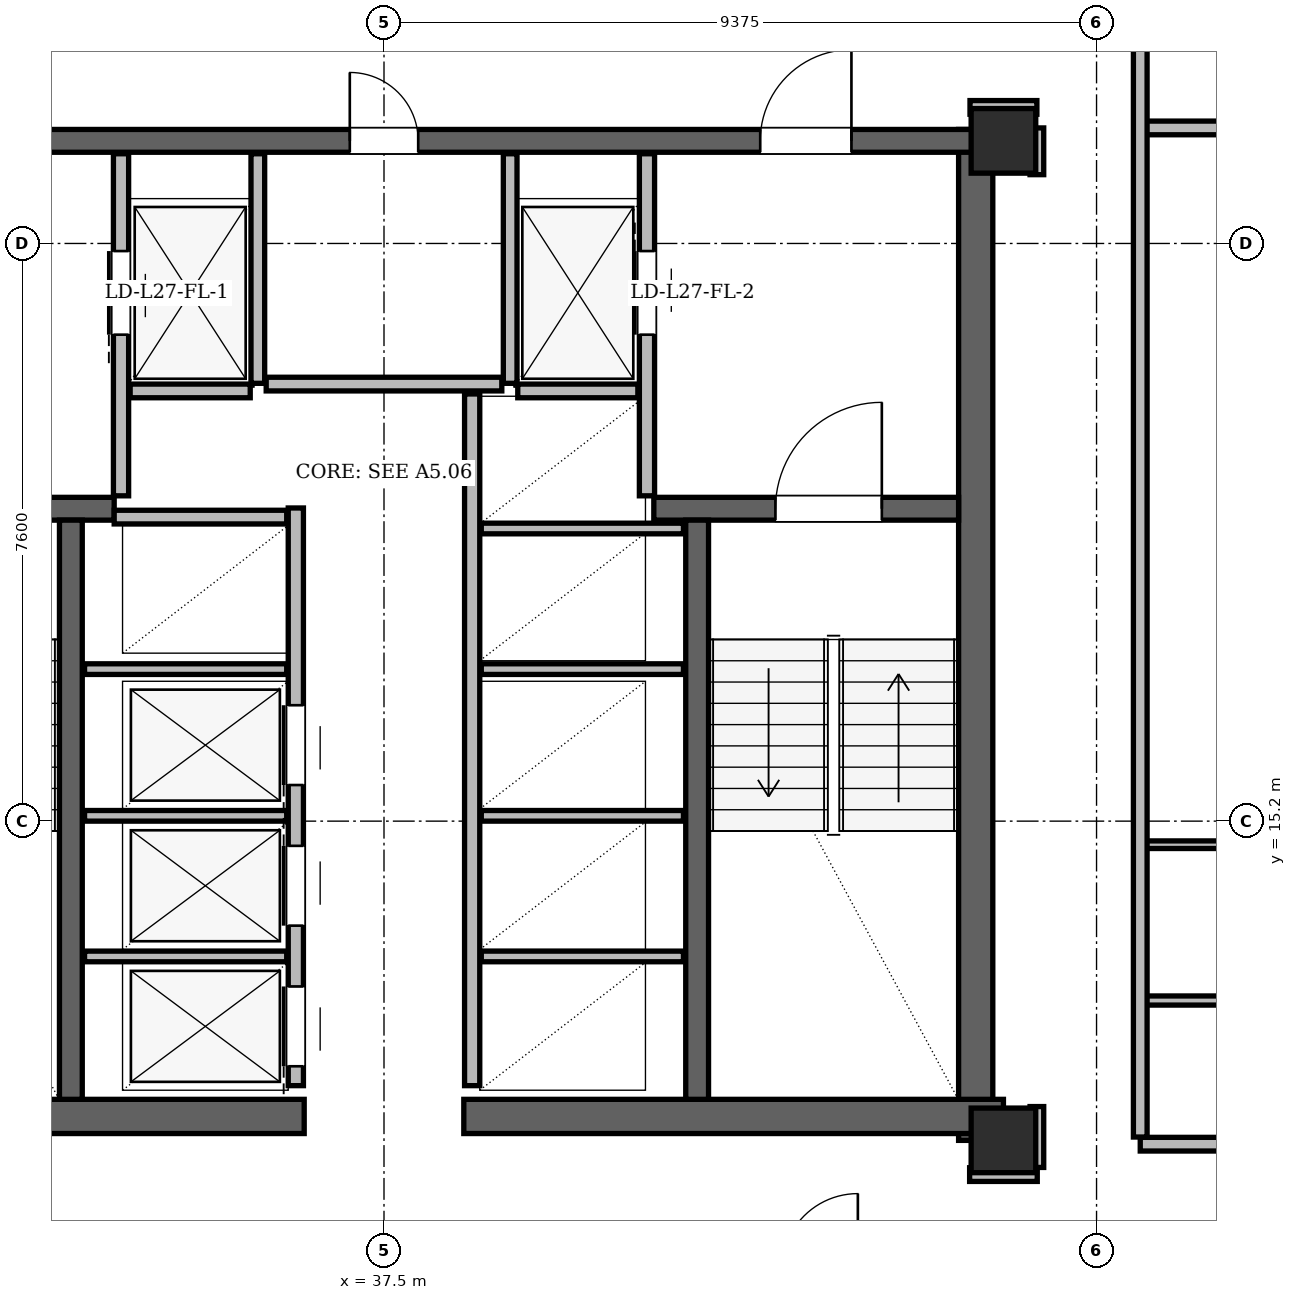
"""IFC4 building model, lengths in metres.
Left out: names, types, materials, properties, quantities, classifications, styles, units other than length and angle.
Written with IfcOpenShell. Run it as: python <this file> out.ifc"""

import sys

from ifc_helpers import new_model, si_unit, direction, frame, frame_2d, origin, origin_2d, place, context, subcontext, project, spatial, rectangle, hollow_rectangle, extrude, element, fill, save


model = new_model("IFC4")
c1 = context("Model", 3, precision=1e-05, world=origin(), true_north=direction((0.0, 1.0)))
c2 = subcontext(c1, "Body", "Model", "MODEL_VIEW")
j1 = project(units=[si_unit("LENGTHUNIT", "METRE"), si_unit("PLANEANGLEUNIT", "RADIAN")], contexts=[c1])
p1 = place(None, origin())
s1 = spatial("IfcSite", under=j1, at=p1, CompositionType="ELEMENT")
p2 = place(p1, origin())
s2 = spatial("IfcBuilding", under=s1, at=p2, CompositionType="ELEMENT")
p3 = place(p2, frame((0.0, 0.0, 104.1)))
s3 = spatial("IfcBuildingStorey", under=s2, at=p3, CompositionType="ELEMENT", Elevation=104.1)
for number, where, z_axis, x_axis in (
    (1, (45.65, 11.0, 0.0), (0.0, 0.0, 1.0), (1.0, 0.0, 0.0)),
    (2, (45.65, 24.15, 0.0), (0.0, 0.0, 1.0), (1.0, 0.0, 0.0)),
):
    element("IfcColumn", number, at=place(p3, frame(where, z_axis=z_axis, x_axis=x_axis)), inside=s3, PredefinedType="COLUMN", context=c2, shape_type="SweptSolid", body=[
        extrude(hollow_rectangle(XDim=0.85, YDim=0.85, WallThickness=0.07, at=origin_2d()), origin(), (0.0, 0.0, 1.0), 3.6),
    ])
p4 = place(p3, frame((45.285, 11.0, 0.0), z_axis=(0.0, 0.0, 1.0), x_axis=(0.0, 1.0, 0.0)))
e3 = element("IfcWall", 3, at=p4, inside=s3, PredefinedType="SHEAR", context=c2, shape_type="SweptSolid", body=[
    extrude(rectangle(XDim=13.3, YDim=0.45, at=frame_2d((6.65, 0.0))), origin(), (0.0, 0.0, 1.0), 3.36),
])
for number, where, z_axis, x_axis in (
    (4, (29.35, 11.315, 0.0), (0.0, 0.0, 1.0), (1.0, 0.0, 0.0)),
    (5, (38.55, 11.315, 0.0), (0.0, 0.0, 1.0), (1.0, 0.0, 0.0)),
):
    element("IfcWall", number, at=place(p3, frame(where, z_axis=z_axis, x_axis=x_axis)), inside=s3, PredefinedType="SHEAR", context=c2, shape_type="SweptSolid", body=[
        extrude(rectangle(XDim=7.1, YDim=0.45, at=frame_2d((3.55, 0.0))), origin(), (0.0, 0.0, 1.0), 3.36),
    ])
p5 = place(p3, frame((29.65, 24.15, 0.0), z_axis=(0.0, 0.0, 1.0), x_axis=(1.0, 0.0, 0.0)))
e6 = element("IfcWall", 6, at=p5, inside=s3, PredefinedType="SHEAR", context=c2, shape_type="SweptSolid", body=[
    extrude(rectangle(XDim=15.7, YDim=0.3, at=frame_2d((7.85, 0.0))), origin(), (0.0, 0.0, 1.0), 3.36),
])
p6 = place(p5, frame((1.7, 0.0, 0.0)))
e7 = element("IfcOpeningElement", 7, at=p6, cuts=e6, PredefinedType="OPENING", context=c2, shape_type="SweptSolid", body=[
    extrude(rectangle(XDim=1.2, YDim=2.2, at=frame_2d((0.6, 1.1))), frame((0.0, 0.15, 0.0), z_axis=(0.0, -1.0, 0.0), x_axis=(1.0, 0.0, 0.0)), (0.0, 0.0, 1.0), 0.3),
])
p7 = place(p5, frame((12.8, 0.0, 0.0)))
e8 = element("IfcOpeningElement", 8, at=p7, cuts=e6, PredefinedType="OPENING", context=c2, shape_type="SweptSolid", body=[
    extrude(rectangle(XDim=1.2, YDim=2.2, at=frame_2d((0.6, 1.1))), frame((0.0, 0.15, 0.0), z_axis=(0.0, -1.0, 0.0), x_axis=(1.0, 0.0, 0.0)), (0.0, 0.0, 1.0), 0.3),
])
p8 = place(p5, frame((7.4, 0.0, 0.0)))
e9 = element("IfcOpeningElement", 9, at=p8, cuts=e6, PredefinedType="OPENING", context=c2, shape_type="SweptSolid", body=[
    extrude(rectangle(XDim=0.9, YDim=2.05, at=frame_2d((0.45, 1.025))), frame((0.0, 0.15, 0.0), z_axis=(0.0, -1.0, 0.0), x_axis=(1.0, 0.0, 0.0)), (0.0, 0.0, 1.0), 0.3),
])
p9 = place(p3, frame((29.94, 19.31, 0.0), z_axis=(0.0, 0.0, 1.0), x_axis=(1.0, 0.0, 0.0)))
e10 = element("IfcWall", 10, at=p9, inside=s3, PredefinedType="SHEAR", context=c2, shape_type="SweptSolid", body=[
    extrude(rectangle(XDim=4.01, YDim=0.3, at=frame_2d((2.005, 0.0))), origin(), (0.0, 0.0, 1.0), 3.36),
])
p10 = place(p9, frame((1.01, 0.0, 0.0)))
e11 = element("IfcOpeningElement", 11, at=p10, cuts=e10, PredefinedType="OPENING", context=c2, shape_type="SweptSolid", body=[
    extrude(rectangle(XDim=1.4, YDim=2.2, at=frame_2d((0.7, 1.1))), frame((0.0, 0.15, 0.0), z_axis=(0.0, -1.0, 0.0), x_axis=(1.0, 0.0, 0.0)), (0.0, 0.0, 1.0), 0.3),
])
p11 = place(p3, frame((41.05, 19.31, 0.0), z_axis=(0.0, 0.0, 1.0), x_axis=(1.0, 0.0, 0.0)))
e12 = element("IfcWall", 12, at=p11, inside=s3, PredefinedType="SHEAR", context=c2, shape_type="SweptSolid", body=[
    extrude(rectangle(XDim=4.01, YDim=0.3, at=frame_2d((2.005, 0.0))), origin(), (0.0, 0.0, 1.0), 3.36),
])
p12 = place(p11, frame((1.6, 0.0, 0.0)))
e13 = element("IfcOpeningElement", 13, at=p12, cuts=e12, PredefinedType="OPENING", context=c2, shape_type="SweptSolid", body=[
    extrude(rectangle(XDim=1.4, YDim=2.2, at=frame_2d((0.7, 1.1))), frame((0.0, 0.15, 0.0), z_axis=(0.0, -1.0, 0.0), x_axis=(1.0, 0.0, 0.0)), (0.0, 0.0, 1.0), 0.3),
])
for number, where, z_axis, x_axis in (
    (14, (33.38, 11.54, 0.0), (0.0, 0.0, 1.0), (0.0, 1.0, 0.0)),
    (15, (41.62, 11.54, 0.0), (0.0, 0.0, 1.0), (0.0, 1.0, 0.0)),
):
    element("IfcWall", number, at=place(p3, frame(where, z_axis=z_axis, x_axis=x_axis)), inside=s3, PredefinedType="SHEAR", context=c2, shape_type="SweptSolid", body=[
        extrude(rectangle(XDim=7.62, YDim=0.3, at=frame_2d((3.81, 0.0))), origin(), (0.0, 0.0, 1.0), 3.36),
    ])
p13 = place(p3, frame((60.635, 13.483, 0.0), z_axis=(0.0, 0.0, 1.0), x_axis=(-0.499998569178, 0.866026229868, 0.0)))
e16 = element("IfcWall", 16, at=p13, inside=s3, PredefinedType="SOLIDWALL", context=c2, shape_type="SweptSolid", body=[
    extrude(rectangle(XDim=34.595, YDim=0.34, at=frame_2d((17.298, 0.0))), origin(), (0.0, 0.0, 1.0), 2.578),
])
p14 = place(p13, frame((6.369, 0.0, 0.0)))
e17 = element("IfcOpeningElement", 17, at=p14, cuts=e16, PredefinedType="OPENING", context=c2, shape_type="SweptSolid", body=[
    extrude(rectangle(XDim=1.5, YDim=2.2, at=frame_2d((0.75, 1.1))), frame((0.0, 0.17, 0.0), z_axis=(0.0, -1.0, 0.0), x_axis=(1.0, 0.0, 0.0)), (0.0, 0.0, 1.0), 0.34),
])
p15 = place(p13, frame((25.061, 0.0, 0.0)))
e18 = element("IfcOpeningElement", 18, at=p15, cuts=e16, PredefinedType="OPENING", context=c2, shape_type="SweptSolid", body=[
    extrude(rectangle(XDim=1.5, YDim=2.2, at=frame_2d((0.75, 1.1))), frame((0.0, 0.17, 0.0), z_axis=(0.0, -1.0, 0.0), x_axis=(1.0, 0.0, 0.0)), (0.0, 0.0, 1.0), 0.34),
])
p16 = place(p13, frame((1.488, 0.0, 0.85)))
e19 = element("IfcOpeningElement", 19, at=p16, cuts=e16, PredefinedType="OPENING", context=c2, shape_type="SweptSolid", body=[
    extrude(rectangle(XDim=2.5, YDim=1.618, at=frame_2d((1.25, 0.809))), frame((0.0, 0.17, 0.0), z_axis=(0.0, -1.0, 0.0), x_axis=(1.0, 0.0, 0.0)), (0.0, 0.0, 1.0), 0.34),
])
p17 = place(p13, frame((11.047, 0.0, 0.85)))
e20 = element("IfcOpeningElement", 20, at=p17, cuts=e16, PredefinedType="OPENING", context=c2, shape_type="SweptSolid", body=[
    extrude(rectangle(XDim=1.2, YDim=1.48, at=frame_2d((0.6, 0.74))), frame((0.0, 0.17, 0.0), z_axis=(0.0, -1.0, 0.0), x_axis=(1.0, 0.0, 0.0)), (0.0, 0.0, 1.0), 0.34),
])
p18 = place(p13, frame((16.194, 0.0, 0.85)))
e21 = element("IfcOpeningElement", 21, at=p18, cuts=e16, PredefinedType="OPENING", context=c2, shape_type="SweptSolid", body=[
    extrude(rectangle(XDim=1.4, YDim=1.6, at=frame_2d((0.7, 0.8))), frame((0.0, 0.17, 0.0), z_axis=(0.0, -1.0, 0.0), x_axis=(1.0, 0.0, 0.0)), (0.0, 0.0, 1.0), 0.34),
])
p19 = place(p13, frame((30.772, 0.0, 0.85)))
e22 = element("IfcOpeningElement", 22, at=p19, cuts=e16, PredefinedType="OPENING", context=c2, shape_type="SweptSolid", body=[
    extrude(rectangle(XDim=2.5, YDim=1.618, at=frame_2d((1.25, 0.809))), frame((0.0, 0.17, 0.0), z_axis=(0.0, -1.0, 0.0), x_axis=(1.0, 0.0, 0.0)), (0.0, 0.0, 1.0), 0.34),
])
p20 = place(p3, frame((34.04, 19.48, 0.0), z_axis=(0.0, 0.0, 1.0), x_axis=(0.0, 1.0, 0.0)))
e23 = element("IfcWall", 23, at=p20, inside=s3, PredefinedType="PARTITIONING", context=c2, shape_type="SweptSolid", body=[
    extrude(rectangle(XDim=4.5, YDim=0.2, at=frame_2d((2.25, 0.0))), origin(), (0.0, 0.0, 1.0), 2.4),
])
p21 = place(p20, frame((2.12, 0.0, 0.0)))
e24 = element("IfcOpeningElement", 24, at=p21, cuts=e23, PredefinedType="OPENING", context=c2, shape_type="SweptSolid", body=[
    extrude(rectangle(XDim=1.1, YDim=2.2, at=frame_2d((0.55, 1.1))), frame((0.0, 0.1, 0.0), z_axis=(0.0, -1.0, 0.0), x_axis=(1.0, 0.0, 0.0)), (0.0, 0.0, 1.0), 0.2),
])
p22 = place(p3, frame((35.84, 20.96, 0.0), z_axis=(0.0, 0.0, 1.0), x_axis=(0.0, 1.0, 0.0)))
e25 = element("IfcWall", 25, at=p22, inside=s3, PredefinedType="PARTITIONING", context=c2, shape_type="SweptSolid", body=[
    extrude(rectangle(XDim=3.02, YDim=0.18, at=frame_2d((1.51, 0.0))), origin(), (0.0, 0.0, 1.0), 2.4),
])
p23 = place(p3, frame((34.16, 20.86, 0.0), z_axis=(0.0, 0.0, 1.0), x_axis=(1.0, 0.0, 0.0)))
e26 = element("IfcWall", 26, at=p23, inside=s3, PredefinedType="PARTITIONING", context=c2, shape_type="SweptSolid", body=[
    extrude(rectangle(XDim=1.58, YDim=0.18, at=frame_2d((0.79, 0.0))), origin(), (0.0, 0.0, 1.0), 3.36),
])
p24 = place(p3, frame((40.96, 19.48, 0.0), z_axis=(0.0, 0.0, 1.0), x_axis=(0.0, 1.0, 0.0)))
e27 = element("IfcWall", 27, at=p24, inside=s3, PredefinedType="PARTITIONING", context=c2, shape_type="SweptSolid", body=[
    extrude(rectangle(XDim=4.5, YDim=0.2, at=frame_2d((2.25, 0.0))), origin(), (0.0, 0.0, 1.0), 2.4),
])
p25 = place(p24, frame((2.12, 0.0, 0.0)))
e28 = element("IfcOpeningElement", 28, at=p25, cuts=e27, PredefinedType="OPENING", context=c2, shape_type="SweptSolid", body=[
    extrude(rectangle(XDim=1.1, YDim=2.2, at=frame_2d((0.55, 1.1))), frame((0.0, 0.1, 0.0), z_axis=(0.0, -1.0, 0.0), x_axis=(1.0, 0.0, 0.0)), (0.0, 0.0, 1.0), 0.2),
])
p26 = place(p3, frame((39.16, 20.96, 0.0), z_axis=(0.0, 0.0, 1.0), x_axis=(0.0, 1.0, 0.0)))
e29 = element("IfcWall", 29, at=p26, inside=s3, PredefinedType="PARTITIONING", context=c2, shape_type="SweptSolid", body=[
    extrude(rectangle(XDim=3.02, YDim=0.18, at=frame_2d((1.51, 0.0))), origin(), (0.0, 0.0, 1.0), 2.4),
])
p27 = place(p3, frame((39.26, 20.86, 0.0), z_axis=(0.0, 0.0, 1.0), x_axis=(1.0, 0.0, 0.0)))
e30 = element("IfcWall", 30, at=p27, inside=s3, PredefinedType="PARTITIONING", context=c2, shape_type="SweptSolid", body=[
    extrude(rectangle(XDim=1.58, YDim=0.18, at=frame_2d((0.79, 0.0))), origin(), (0.0, 0.0, 1.0), 3.36),
])
p28 = place(p3, frame((36.34, 11.72, 0.0), z_axis=(0.0, 0.0, 1.0), x_axis=(0.0, 1.0, 0.0)))
e31 = element("IfcWall", 31, at=p28, inside=s3, PredefinedType="PARTITIONING", context=c2, shape_type="SweptSolid", body=[
    extrude(rectangle(XDim=7.6, YDim=0.2, at=frame_2d((3.8, 0.0))), origin(), (0.0, 0.0, 1.0), 3.36),
])
p29 = place(p28, frame((0.255, 0.0, 0.0)))
e32 = element("IfcOpeningElement", 32, at=p29, cuts=e31, PredefinedType="OPENING", context=c2, shape_type="SweptSolid", body=[
    extrude(rectangle(XDim=1.05, YDim=2.15, at=frame_2d((0.525, 1.075))), frame((0.0, 0.1, 0.0), z_axis=(0.0, -1.0, 0.0), x_axis=(1.0, 0.0, 0.0)), (0.0, 0.0, 1.0), 0.2),
])
p30 = place(p28, frame((2.105, 0.0, 0.0)))
e33 = element("IfcOpeningElement", 33, at=p30, cuts=e31, PredefinedType="OPENING", context=c2, shape_type="SweptSolid", body=[
    extrude(rectangle(XDim=1.05, YDim=2.15, at=frame_2d((0.525, 1.075))), frame((0.0, 0.1, 0.0), z_axis=(0.0, -1.0, 0.0), x_axis=(1.0, 0.0, 0.0)), (0.0, 0.0, 1.0), 0.2),
])
p31 = place(p28, frame((3.955, 0.0, 0.0)))
e34 = element("IfcOpeningElement", 34, at=p31, cuts=e31, PredefinedType="OPENING", context=c2, shape_type="SweptSolid", body=[
    extrude(rectangle(XDim=1.05, YDim=2.15, at=frame_2d((0.525, 1.075))), frame((0.0, 0.1, 0.0), z_axis=(0.0, -1.0, 0.0), x_axis=(1.0, 0.0, 0.0)), (0.0, 0.0, 1.0), 0.2),
])
p32 = place(p3, frame((33.95, 19.2, 0.0), z_axis=(0.0, 0.0, 1.0), x_axis=(1.0, 0.0, 0.0)))
e35 = element("IfcWall", 35, at=p32, inside=s3, PredefinedType="PARTITIONING", context=c2, shape_type="SweptSolid", body=[
    extrude(rectangle(XDim=2.27, YDim=0.18, at=frame_2d((1.135, 0.0))), origin(), (0.0, 0.0, 1.0), 3.36),
])
for number, where, z_axis, x_axis in (
    (36, (33.56, 13.42, 0.0), (0.0, 0.0, 1.0), (1.0, 0.0, 0.0)),
    (37, (33.56, 15.27, 0.0), (0.0, 0.0, 1.0), (1.0, 0.0, 0.0)),
    (38, (33.56, 17.2, 0.0), (0.0, 0.0, 1.0), (1.0, 0.0, 0.0)),
):
    element("IfcWall", number, at=place(p3, frame(where, z_axis=z_axis, x_axis=x_axis)), inside=s3, PredefinedType="PARTITIONING", context=c2, shape_type="SweptSolid", body=[
        extrude(rectangle(XDim=2.66, YDim=0.14, at=frame_2d((1.33, 0.0))), origin(), (0.0, 0.0, 1.0), 3.36),
    ])
p33 = place(p3, frame((38.66, 11.72, 0.0), z_axis=(0.0, 0.0, 1.0), x_axis=(0.0, 1.0, 0.0)))
e39 = element("IfcWall", 39, at=p33, inside=s3, PredefinedType="PARTITIONING", context=c2, shape_type="SweptSolid", body=[
    extrude(rectangle(XDim=9.1, YDim=0.2, at=frame_2d((4.55, 0.0))), origin(), (0.0, 0.0, 1.0), 3.36),
])
for number, where, z_axis, x_axis in (
    (40, (38.78, 13.42, 0.0), (0.0, 0.0, 1.0), (1.0, 0.0, 0.0)),
    (41, (38.78, 15.27, 0.0), (0.0, 0.0, 1.0), (1.0, 0.0, 0.0)),
    (42, (38.78, 17.2, 0.0), (0.0, 0.0, 1.0), (1.0, 0.0, 0.0)),
    (43, (38.78, 19.05, 0.0), (0.0, 0.0, 1.0), (1.0, 0.0, 0.0)),
):
    element("IfcWall", number, at=place(p3, frame(where, z_axis=z_axis, x_axis=x_axis)), inside=s3, PredefinedType="PARTITIONING", context=c2, shape_type="SweptSolid", body=[
        extrude(rectangle(XDim=2.66, YDim=0.14, at=frame_2d((1.33, 0.0))), origin(), (0.0, 0.0, 1.0), 3.36),
    ])
p34 = place(p3, frame((35.95, 20.95, 0.0), z_axis=(0.0, 0.0, 1.0), x_axis=(1.0, 0.0, 0.0)))
e44 = element("IfcWall", 44, at=p34, inside=s3, PredefinedType="PARTITIONING", context=c2, shape_type="SweptSolid", body=[
    extrude(rectangle(XDim=3.1, YDim=0.18, at=frame_2d((1.55, 0.0))), origin(), (0.0, 0.0, 1.0), 3.36),
])
p35 = place(p3, frame((45.205, 10.55, 0.0), z_axis=(0.0, 0.0, 1.0), x_axis=(1.0, 0.0, 0.0)))
e45 = element("IfcWall", 45, at=p35, inside=s3, PredefinedType="PARTITIONING", context=c2, shape_type="SweptSolid", body=[
    extrude(rectangle(XDim=0.89, YDim=0.18, at=frame_2d((0.445, 0.0))), origin(), (0.0, 0.0, 1.0), 3.36),
])
p36 = place(p3, frame((47.45, 10.95, 0.0), z_axis=(0.0, 0.0, 1.0), x_axis=(1.0, 0.0, 0.0)))
e46 = element("IfcWall", 46, at=p36, inside=s3, PredefinedType="PARTITIONING", context=c2, shape_type="SweptSolid", body=[
    extrude(rectangle(XDim=11.521, YDim=0.18, at=frame_2d((5.761, 0.0))), origin(), (0.0, 0.0, 1.0), 3.36),
])
p37 = place(p36, frame((5.756, 0.0, 0.0)))
e47 = element("IfcOpeningElement", 47, at=p37, cuts=e46, PredefinedType="OPENING", context=c2, shape_type="SweptSolid", body=[
    extrude(rectangle(XDim=1.0, YDim=2.18, at=frame_2d((0.5, 1.09))), frame((0.0, 0.09, 0.0), z_axis=(0.0, -1.0, 0.0), x_axis=(1.0, 0.0, 0.0)), (0.0, 0.0, 1.0), 0.18),
])
p38 = place(p3, frame((47.4, 12.84, 0.0), z_axis=(0.0, 0.0, 1.0), x_axis=(1.0, 0.0, 0.0)))
e48 = element("IfcWall", 48, at=p38, inside=s3, PredefinedType="PARTITIONING", context=c2, shape_type="SweptSolid", body=[
    extrude(rectangle(XDim=4.4, YDim=0.12, at=frame_2d((2.2, 0.0))), origin(), (0.0, 0.0, 1.0), 3.36),
])
p39 = place(p3, frame((47.4, 14.89, 0.0), z_axis=(0.0, 0.0, 1.0), x_axis=(1.0, 0.0, 0.0)))
e49 = element("IfcWall", 49, at=p39, inside=s3, PredefinedType="PARTITIONING", context=c2, shape_type="SweptSolid", body=[
    extrude(rectangle(XDim=4.4, YDim=0.1, at=frame_2d((2.2, 0.0))), origin(), (0.0, 0.0, 1.0), 2.946),
])
p40 = place(p3, frame((47.45, 24.32, 0.0), z_axis=(0.0, 0.0, 1.0), x_axis=(1.0, 0.0, 0.0)))
e50 = element("IfcWall", 50, at=p40, inside=s3, PredefinedType="PARTITIONING", context=c2, shape_type="SweptSolid", body=[
    extrude(rectangle(XDim=6.727, YDim=0.18, at=frame_2d((3.364, 0.0))), origin(), (0.0, 0.0, 1.0), 3.36),
])
p41 = place(p3, frame((45.21, 24.59, 0.0), z_axis=(0.0, 0.0, 1.0), x_axis=(1.0, 0.0, 0.0)))
e51 = element("IfcWall", 51, at=p41, inside=s3, PredefinedType="PARTITIONING", context=c2, shape_type="SweptSolid", body=[
    extrude(rectangle(XDim=0.88, YDim=0.18, at=frame_2d((0.44, 0.0))), origin(), (0.0, 0.0, 1.0), 2.814),
])
p42 = place(p3, frame((46.09, 10.644, 0.0), z_axis=(0.0, 0.0, 1.0), x_axis=(0.0, 1.0, 0.0)))
e52 = element("IfcWall", 52, at=p42, inside=s3, PredefinedType="PARTITIONING", context=c2, shape_type="SweptSolid", body=[
    extrude(rectangle(XDim=0.801, YDim=0.18, at=frame_2d((0.4, 0.0))), origin(), (0.0, 0.0, 1.0), 2.814),
])
p43 = place(p3, frame((46.09, 23.705, 0.0), z_axis=(0.0, 0.0, 1.0), x_axis=(0.0, 1.0, 0.0)))
e53 = element("IfcWall", 53, at=p43, inside=s3, PredefinedType="PARTITIONING", context=c2, shape_type="SweptSolid", body=[
    extrude(rectangle(XDim=0.615, YDim=0.18, at=frame_2d((0.308, 0.0))), origin(), (0.0, 0.0, 1.0), 2.946),
])
p44 = place(p3, frame((47.45, 11.044, 0.0), z_axis=(0.0, 0.0, 1.0), x_axis=(0.0, 1.0, 0.0)))
e54 = element("IfcWall", 54, at=p44, inside=s3, PredefinedType="PARTITIONING", context=c2, shape_type="SweptSolid", body=[
    extrude(rectangle(XDim=14.832, YDim=0.18, at=frame_2d((7.416, 0.0))), origin(), (0.0, 0.0, 1.0), 2.814),
])
p45 = place(p21, origin())
e55 = element("IfcDoor", 55, at=p45, inside=s3, OperationType="SLIDING_TO_LEFT", PredefinedType="DOOR", context=c2, shape_type="SweptSolid", body=[
    extrude(rectangle(XDim=1.1, YDim=2.2, at=frame_2d((0.55, 1.1))), frame((0.0, 0.025, 0.0), z_axis=(0.0, -1.0, 0.0), x_axis=(1.0, 0.0, 0.0)), (0.0, 0.0, 1.0), 0.05),
])
fill(e24, e55)
p46 = place(p25, origin())
e56 = element("IfcDoor", 56, at=p46, inside=s3, OperationType="SLIDING_TO_RIGHT", PredefinedType="DOOR", context=c2, shape_type="SweptSolid", body=[
    extrude(rectangle(XDim=1.1, YDim=2.2, at=frame_2d((0.55, 1.1))), frame((0.0, 0.025, 0.0), z_axis=(0.0, -1.0, 0.0), x_axis=(1.0, 0.0, 0.0)), (0.0, 0.0, 1.0), 0.05),
])
fill(e28, e56)
p47 = place(p29, origin())
e57 = element("IfcDoor", 57, at=p47, inside=s3, OperationType="SLIDING_TO_LEFT", PredefinedType="DOOR", context=c2, shape_type="SweptSolid", body=[
    extrude(rectangle(XDim=1.05, YDim=2.15, at=frame_2d((0.525, 1.075))), frame((0.0, 0.025, 0.0), z_axis=(0.0, -1.0, 0.0), x_axis=(1.0, 0.0, 0.0)), (0.0, 0.0, 1.0), 0.05),
])
fill(e32, e57)
p48 = place(p30, origin())
e58 = element("IfcDoor", 58, at=p48, inside=s3, OperationType="SLIDING_TO_RIGHT", PredefinedType="DOOR", context=c2, shape_type="SweptSolid", body=[
    extrude(rectangle(XDim=1.05, YDim=2.15, at=frame_2d((0.525, 1.075))), frame((0.0, 0.025, 0.0), z_axis=(0.0, -1.0, 0.0), x_axis=(1.0, 0.0, 0.0)), (0.0, 0.0, 1.0), 0.05),
])
fill(e33, e58)
p49 = place(p31, origin())
e59 = element("IfcDoor", 59, at=p49, inside=s3, OperationType="SLIDING_TO_LEFT", PredefinedType="DOOR", context=c2, shape_type="SweptSolid", body=[
    extrude(rectangle(XDim=1.05, YDim=2.15, at=frame_2d((0.525, 1.075))), frame((0.0, 0.025, 0.0), z_axis=(0.0, -1.0, 0.0), x_axis=(1.0, 0.0, 0.0)), (0.0, 0.0, 1.0), 0.05),
])
fill(e34, e59)
p50 = place(p12, origin())
e60 = element("IfcDoor", 60, at=p50, inside=s3, OperationType="SINGLE_SWING_RIGHT", PredefinedType="DOOR", context=c2, shape_type="SweptSolid", body=[
    extrude(rectangle(XDim=1.4, YDim=2.2, at=frame_2d((0.7, 1.1))), frame((0.0, 0.025, 0.0), z_axis=(0.0, -1.0, 0.0), x_axis=(1.0, 0.0, 0.0)), (0.0, 0.0, 1.0), 0.05),
])
fill(e13, e60)
p51 = place(p7, origin())
e61 = element("IfcDoor", 61, at=p51, inside=s3, OperationType="SINGLE_SWING_RIGHT", PredefinedType="DOOR", context=c2, shape_type="SweptSolid", body=[
    extrude(rectangle(XDim=1.2, YDim=2.2, at=frame_2d((0.6, 1.1))), frame((0.0, 0.025, 0.0), z_axis=(0.0, -1.0, 0.0), x_axis=(1.0, 0.0, 0.0)), (0.0, 0.0, 1.0), 0.05),
])
fill(e8, e61)
p52 = place(p8, origin())
e62 = element("IfcDoor", 62, at=p52, inside=s3, OperationType="SINGLE_SWING_LEFT", PredefinedType="DOOR", context=c2, shape_type="SweptSolid", body=[
    extrude(rectangle(XDim=0.9, YDim=2.05, at=frame_2d((0.45, 1.025))), frame((0.0, 0.025, 0.0), z_axis=(0.0, -1.0, 0.0), x_axis=(1.0, 0.0, 0.0)), (0.0, 0.0, 1.0), 0.05),
])
fill(e9, e62)
save(model, sys.argv[1])
